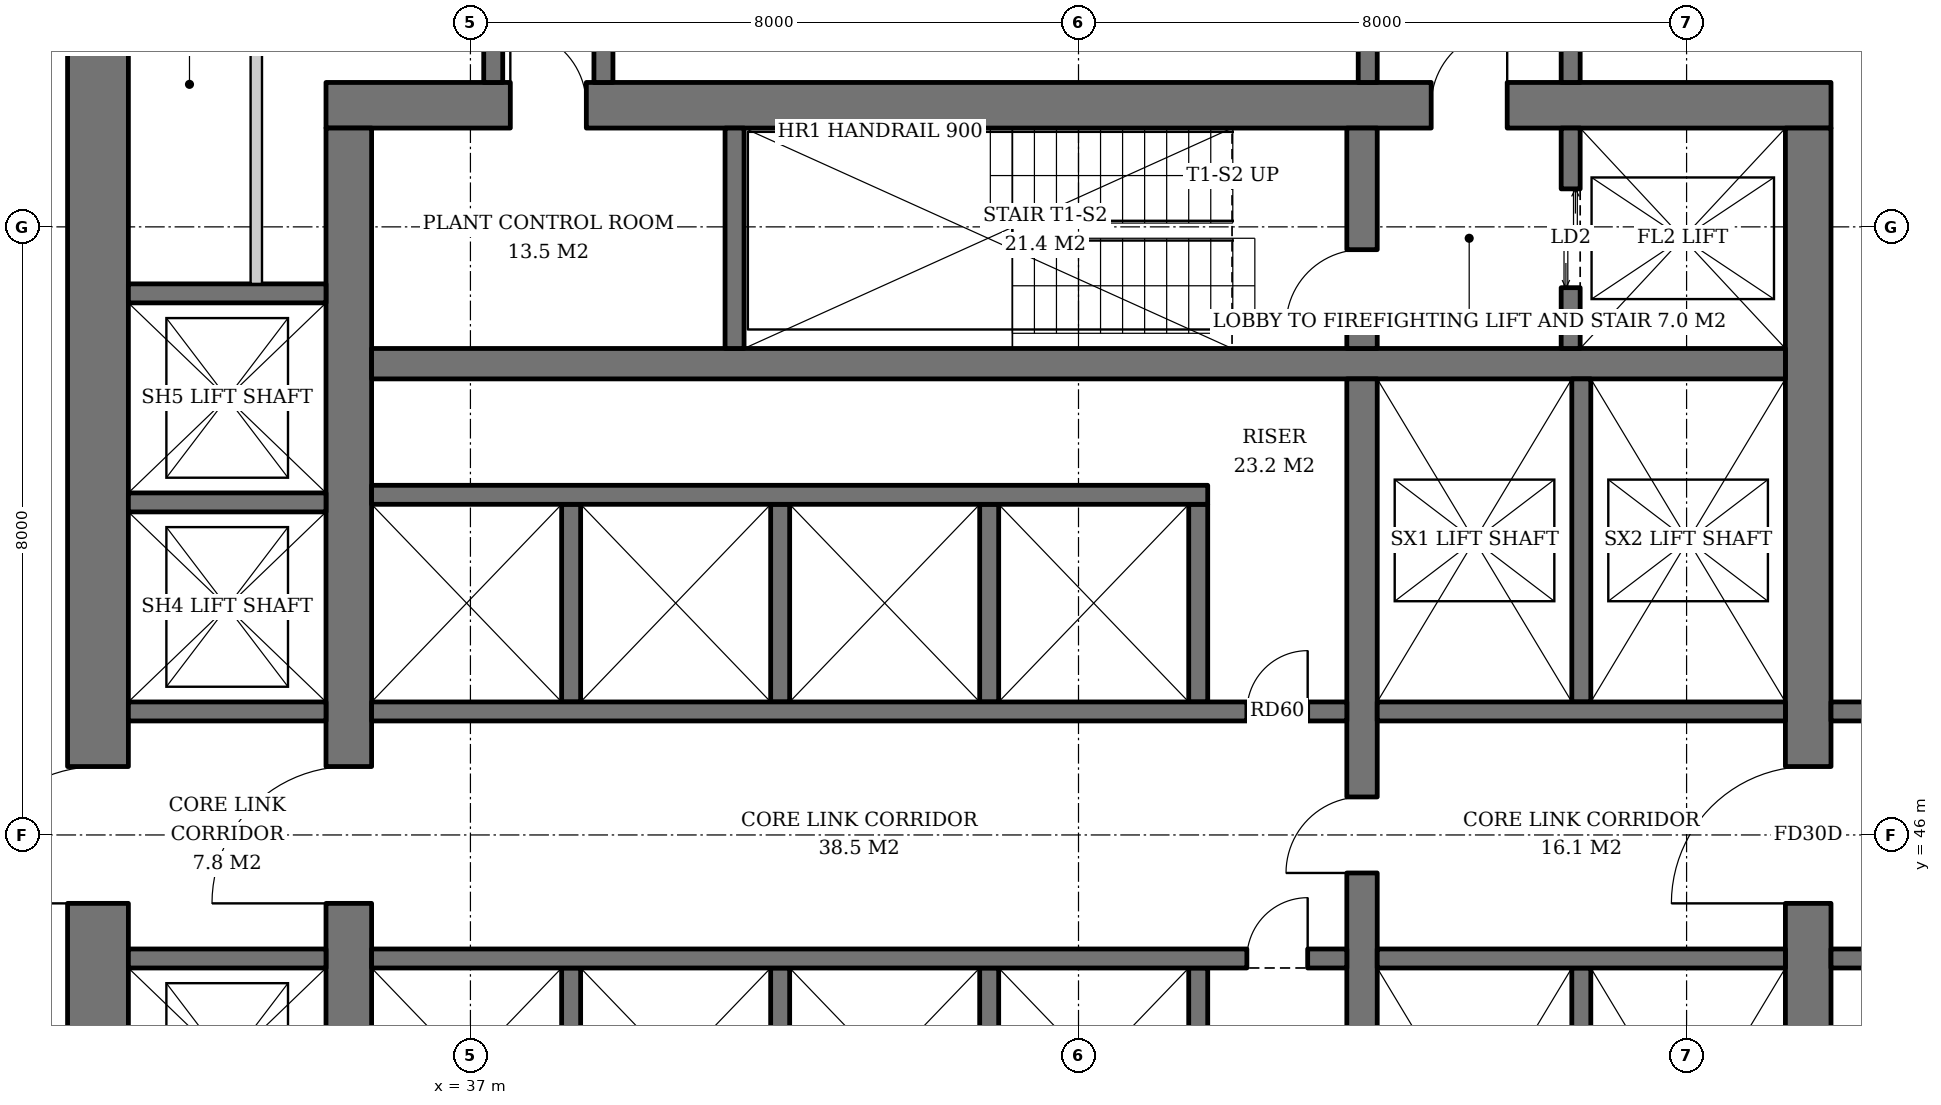
"""IFC4 building model, lengths in metres.
Left out: names, types, materials, properties, quantities, classifications, styles, units other than length and angle.
Written with IfcOpenShell. Run it as: python <this file> out.ifc"""

import sys

from ifc_helpers import new_model, si_unit, direction, frame, frame_2d, origin, place, context, subcontext, project, spatial, rectangle, extrude, element, fill, save


model = new_model("IFC4")
c1 = context("Model", 3, precision=1e-05, world=origin(), true_north=direction((0.0, 1.0)))
c2 = subcontext(c1, "Body", "Model", "MODEL_VIEW")
j1 = project(units=[si_unit("LENGTHUNIT", "METRE"), si_unit("PLANEANGLEUNIT", "RADIAN")], contexts=[c1])
p1 = place(None, origin())
s1 = spatial("IfcSite", under=j1, at=p1, CompositionType="ELEMENT")
p2 = place(p1, origin())
s2 = spatial("IfcBuilding", under=s1, at=p2, CompositionType="ELEMENT")
p3 = place(p2, frame((0.0, 0.0, 81.8)))
s3 = spatial("IfcBuildingStorey", under=s2, at=p3, CompositionType="ELEMENT", Elevation=81.8)
p4 = place(p3, frame((35.1, 55.6, 0.0), z_axis=(0.0, 0.0, 1.0), x_axis=(1.0, 0.0, 0.0)))
e1 = element("IfcWall", 1, at=p4, inside=s3, PredefinedType="SHEAR", context=c2, shape_type="SweptSolid", body=[
    extrude(rectangle(XDim=19.8, YDim=0.6, at=frame_2d((9.9, 0.0))), origin(), (0.0, 0.0, 1.0), 3.8),
])
p5 = place(p4, frame((14.54, 0.0, 0.0)))
e2 = element("IfcOpeningElement", 2, at=p5, cuts=e1, PredefinedType="OPENING", context=c2, shape_type="SweptSolid", body=[
    extrude(rectangle(XDim=1.0, YDim=2.1, at=frame_2d((0.5, 1.05))), frame((0.0, 0.31, 0.0), z_axis=(0.0, -1.0, 0.0), x_axis=(1.0, 0.0, 0.0)), (0.0, 0.0, 1.0), 0.62),
])
p6 = place(p4, frame((2.425, 0.0, 0.0)))
e3 = element("IfcOpeningElement", 3, at=p6, cuts=e1, PredefinedType="OPENING", context=c2, shape_type="SweptSolid", body=[
    extrude(rectangle(XDim=1.0, YDim=2.1, at=frame_2d((0.5, 1.05))), frame((0.0, 0.31, 0.0), z_axis=(0.0, -1.0, 0.0), x_axis=(1.0, 0.0, 0.0)), (0.0, 0.0, 1.0), 0.62),
])
p7 = place(p3, frame((35.4, 36.7, 0.0), z_axis=(0.0, 0.0, 1.0), x_axis=(0.0, 1.0, 0.0)))
e4 = element("IfcWall", 4, at=p7, inside=s3, PredefinedType="SHEAR", context=c2, shape_type="SweptSolid", body=[
    extrude(rectangle(XDim=18.6, YDim=0.6, at=frame_2d((9.3, 0.0))), origin(), (0.0, 0.0, 1.0), 3.8),
])
p8 = place(p7, frame((8.4, 0.0, 0.0)))
e5 = element("IfcOpeningElement", 5, at=p8, cuts=e4, PredefinedType="OPENING", context=c2, shape_type="SweptSolid", body=[
    extrude(rectangle(XDim=1.8, YDim=2.4, at=frame_2d((0.9, 1.2))), frame((0.0, 0.31, 0.0), z_axis=(0.0, -1.0, 0.0), x_axis=(1.0, 0.0, 0.0)), (0.0, 0.0, 1.0), 0.62),
])
p9 = place(p3, frame((54.6, 36.7, 0.0), z_axis=(0.0, 0.0, 1.0), x_axis=(0.0, 1.0, 0.0)))
e6 = element("IfcWall", 6, at=p9, inside=s3, PredefinedType="SHEAR", context=c2, shape_type="SweptSolid", body=[
    extrude(rectangle(XDim=18.6, YDim=0.6, at=frame_2d((9.3, 0.0))), origin(), (0.0, 0.0, 1.0), 3.8),
])
p10 = place(p9, frame((8.4, 0.0, 0.0)))
e7 = element("IfcOpeningElement", 7, at=p10, cuts=e6, PredefinedType="OPENING", context=c2, shape_type="SweptSolid", body=[
    extrude(rectangle(XDim=1.8, YDim=2.4, at=frame_2d((0.9, 1.2))), frame((0.0, 0.31, 0.0), z_axis=(0.0, -1.0, 0.0), x_axis=(1.0, 0.0, 0.0)), (0.0, 0.0, 1.0), 0.62),
])
p11 = place(p3, frame((32.1, 33.5, 0.0), z_axis=(0.0, 0.0, 1.0), x_axis=(0.0, 1.0, 0.0)))
e8 = element("IfcWall", 8, at=p11, inside=s3, PredefinedType="SHEAR", context=c2, shape_type="SweptSolid", body=[
    extrude(rectangle(XDim=25.0, YDim=0.8, at=frame_2d((12.5, 0.0))), origin(), (0.0, 0.0, 1.0), 3.8),
])
p12 = place(p11, frame((11.6, 0.0, 0.0)))
e9 = element("IfcOpeningElement", 9, at=p12, cuts=e8, PredefinedType="OPENING", context=c2, shape_type="SweptSolid", body=[
    extrude(rectangle(XDim=1.8, YDim=2.4, at=frame_2d((0.9, 1.2))), frame((0.0, 0.41, 0.0), z_axis=(0.0, -1.0, 0.0), x_axis=(1.0, 0.0, 0.0)), (0.0, 0.0, 1.0), 0.82),
])
p13 = place(p3, frame((35.7, 52.2, 0.0), z_axis=(0.0, 0.0, 1.0), x_axis=(1.0, 0.0, 0.0)))
e10 = element("IfcWall", 10, at=p13, inside=s3, PredefinedType="SHEAR", context=c2, shape_type="SweptSolid", body=[
    extrude(rectangle(XDim=18.6, YDim=0.4, at=frame_2d((9.3, 0.0))), origin(), (0.0, 0.0, 1.0), 3.8),
])
p14 = place(p3, frame((48.73, 40.0, 0.0), z_axis=(0.0, 0.0, 1.0), x_axis=(0.0, 1.0, 0.0)))
e11 = element("IfcWall", 11, at=p14, inside=s3, PredefinedType="SHEAR", context=c2, shape_type="SweptSolid", body=[
    extrude(rectangle(XDim=12.0, YDim=0.4, at=frame_2d((6.0, 0.0))), origin(), (0.0, 0.0, 1.0), 3.8),
])
p15 = place(p14, frame((5.5, 0.0, 0.0)))
e12 = element("IfcOpeningElement", 12, at=p15, cuts=e11, PredefinedType="OPENING", context=c2, shape_type="SweptSolid", body=[
    extrude(rectangle(XDim=1.0, YDim=2.1, at=frame_2d((0.5, 1.05))), frame((0.0, 0.21, 0.0), z_axis=(0.0, -1.0, 0.0), x_axis=(1.0, 0.0, 0.0)), (0.0, 0.0, 1.0), 0.42),
])
p16 = place(p3, frame((48.73, 52.4, 0.0), z_axis=(0.0, 0.0, 1.0), x_axis=(0.0, 1.0, 0.0)))
e13 = element("IfcWall", 13, at=p16, inside=s3, PredefinedType="SHEAR", context=c2, shape_type="SweptSolid", body=[
    extrude(rectangle(XDim=2.9, YDim=0.4, at=frame_2d((1.45, 0.0))), origin(), (0.0, 0.0, 1.0), 3.8),
])
p17 = place(p16, frame((0.3, 0.0, 0.0)))
e14 = element("IfcOpeningElement", 14, at=p17, cuts=e13, PredefinedType="OPENING", context=c2, shape_type="SweptSolid", body=[
    extrude(rectangle(XDim=1.0, YDim=2.1, at=frame_2d((0.5, 1.05))), frame((0.0, 0.21, 0.0), z_axis=(0.0, -1.0, 0.0), x_axis=(1.0, 0.0, 0.0)), (0.0, 0.0, 1.0), 0.42),
])
p18 = place(p3, frame((40.475, 52.4, 0.0), z_axis=(0.0, 0.0, 1.0), x_axis=(0.0, 1.0, 0.0)))
e15 = element("IfcWall", 15, at=p18, inside=s3, PredefinedType="SHEAR", context=c2, shape_type="SweptSolid", body=[
    extrude(rectangle(XDim=2.9, YDim=0.25, at=frame_2d((1.45, 0.0))), origin(), (0.0, 0.0, 1.0), 3.8),
])
p19 = place(p3, frame((51.475, 52.4, 0.0), z_axis=(0.0, 0.0, 1.0), x_axis=(0.0, 1.0, 0.0)))
e16 = element("IfcWall", 16, at=p19, inside=s3, PredefinedType="SHEAR", context=c2, shape_type="SweptSolid", body=[
    extrude(rectangle(XDim=2.9, YDim=0.25, at=frame_2d((1.45, 0.0))), origin(), (0.0, 0.0, 1.0), 3.8),
])
p20 = place(p19, frame((0.8, 0.0, 0.0)))
e17 = element("IfcOpeningElement", 17, at=p20, cuts=e16, PredefinedType="OPENING", context=c2, shape_type="SweptSolid", body=[
    extrude(rectangle(XDim=1.3, YDim=2.2, at=frame_2d((0.65, 1.1))), frame((0.0, 0.135, 0.0), z_axis=(0.0, -1.0, 0.0), x_axis=(1.0, 0.0, 0.0)), (0.0, 0.0, 1.0), 0.27),
])
for number, where, z_axis, x_axis in (
    (18, (38.325, 47.75, 0.0), (0.0, 0.0, 1.0), (0.0, 1.0, 0.0)),
    (19, (41.075, 47.75, 0.0), (0.0, 0.0, 1.0), (0.0, 1.0, 0.0)),
    (20, (43.825, 47.75, 0.0), (0.0, 0.0, 1.0), (0.0, 1.0, 0.0)),
    (21, (46.575, 47.75, 0.0), (0.0, 0.0, 1.0), (0.0, 1.0, 0.0)),
):
    element("IfcWall", number, at=place(p3, frame(where, z_axis=z_axis, x_axis=x_axis)), inside=s3, PredefinedType="SHEAR", context=c2, shape_type="SweptSolid", body=[
        extrude(rectangle(XDim=2.6, YDim=0.25, at=frame_2d((1.3, 0.0))), origin(), (0.0, 0.0, 1.0), 3.8),
    ])
p21 = place(p3, frame((35.7, 50.475, 0.0), z_axis=(0.0, 0.0, 1.0), x_axis=(1.0, 0.0, 0.0)))
e22 = element("IfcWall", 22, at=p21, inside=s3, PredefinedType="SHEAR", context=c2, shape_type="SweptSolid", body=[
    extrude(rectangle(XDim=11.0, YDim=0.25, at=frame_2d((5.5, 0.0))), origin(), (0.0, 0.0, 1.0), 3.8),
])
p22 = place(p3, frame((35.7, 47.625, 0.0), z_axis=(0.0, 0.0, 1.0), x_axis=(1.0, 0.0, 0.0)))
e23 = element("IfcWall", 23, at=p22, inside=s3, PredefinedType="SHEAR", context=c2, shape_type="SweptSolid", body=[
    extrude(rectangle(XDim=12.83, YDim=0.25, at=frame_2d((6.415, 0.0))), origin(), (0.0, 0.0, 1.0), 3.8),
])
p23 = place(p22, frame((11.515, 0.0, 0.0)))
e24 = element("IfcOpeningElement", 24, at=p23, cuts=e23, PredefinedType="OPENING", context=c2, shape_type="SweptSolid", body=[
    extrude(rectangle(XDim=0.8, YDim=2.0, at=frame_2d((0.4, 1.0))), frame((0.0, 0.135, 0.0), z_axis=(0.0, -1.0, 0.0), x_axis=(1.0, 0.0, 0.0)), (0.0, 0.0, 1.0), 0.27),
])
for number, where, z_axis, x_axis in (
    (25, (38.325, 44.25, 0.0), (0.0, 0.0, 1.0), (0.0, -1.0, 0.0)),
    (26, (41.075, 44.25, 0.0), (0.0, 0.0, 1.0), (0.0, -1.0, 0.0)),
    (27, (43.825, 44.25, 0.0), (0.0, 0.0, 1.0), (0.0, -1.0, 0.0)),
    (28, (46.575, 44.25, 0.0), (0.0, 0.0, 1.0), (0.0, -1.0, 0.0)),
):
    element("IfcWall", number, at=place(p3, frame(where, z_axis=z_axis, x_axis=x_axis)), inside=s3, PredefinedType="SHEAR", context=c2, shape_type="SweptSolid", body=[
        extrude(rectangle(XDim=2.6, YDim=0.25, at=frame_2d((1.3, 0.0))), origin(), (0.0, 0.0, 1.0), 3.8),
    ])
p24 = place(p3, frame((35.7, 44.375, 0.0), z_axis=(0.0, 0.0, 1.0), x_axis=(1.0, 0.0, 0.0)))
e29 = element("IfcWall", 29, at=p24, inside=s3, PredefinedType="SHEAR", context=c2, shape_type="SweptSolid", body=[
    extrude(rectangle(XDim=12.83, YDim=0.25, at=frame_2d((6.415, 0.0))), origin(), (0.0, 0.0, 1.0), 3.8),
])
p25 = place(p24, frame((11.515, 0.0, 0.0)))
e30 = element("IfcOpeningElement", 30, at=p25, cuts=e29, PredefinedType="OPENING", context=c2, shape_type="SweptSolid", body=[
    extrude(rectangle(XDim=0.8, YDim=2.0, at=frame_2d((0.4, 1.0))), frame((0.0, 0.135, 0.0), z_axis=(0.0, -1.0, 0.0), x_axis=(1.0, 0.0, 0.0)), (0.0, 0.0, 1.0), 0.27),
])
p26 = place(p3, frame((51.615, 47.75, 0.0), z_axis=(0.0, 0.0, 1.0), x_axis=(0.0, 1.0, 0.0)))
e31 = element("IfcWall", 31, at=p26, inside=s3, PredefinedType="SHEAR", context=c2, shape_type="SweptSolid", body=[
    extrude(rectangle(XDim=4.25, YDim=0.25, at=frame_2d((2.125, 0.0))), origin(), (0.0, 0.0, 1.0), 3.8),
])
p27 = place(p3, frame((48.93, 47.625, 0.0), z_axis=(0.0, 0.0, 1.0), x_axis=(1.0, 0.0, 0.0)))
e32 = element("IfcWall", 32, at=p27, inside=s3, PredefinedType="SHEAR", context=c2, shape_type="SweptSolid", body=[
    extrude(rectangle(XDim=5.37, YDim=0.25, at=frame_2d((2.685, 0.0))), origin(), (0.0, 0.0, 1.0), 3.8),
])
p28 = place(p3, frame((51.615, 44.25, 0.0), z_axis=(0.0, 0.0, 1.0), x_axis=(0.0, -1.0, 0.0)))
e33 = element("IfcWall", 33, at=p28, inside=s3, PredefinedType="SHEAR", context=c2, shape_type="SweptSolid", body=[
    extrude(rectangle(XDim=4.25, YDim=0.25, at=frame_2d((2.125, 0.0))), origin(), (0.0, 0.0, 1.0), 3.8),
])
p29 = place(p3, frame((48.93, 44.375, 0.0), z_axis=(0.0, 0.0, 1.0), x_axis=(1.0, 0.0, 0.0)))
e34 = element("IfcWall", 34, at=p29, inside=s3, PredefinedType="SHEAR", context=c2, shape_type="SweptSolid", body=[
    extrude(rectangle(XDim=5.37, YDim=0.25, at=frame_2d((2.685, 0.0))), origin(), (0.0, 0.0, 1.0), 3.8),
])
for number, where, z_axis, x_axis in (
    (35, (32.5, 44.375, 0.0), (0.0, 0.0, 1.0), (1.0, 0.0, 0.0)),
    (36, (32.5, 47.625, 0.0), (0.0, 0.0, 1.0), (1.0, 0.0, 0.0)),
    (37, (32.5, 50.375, 0.0), (0.0, 0.0, 1.0), (1.0, 0.0, 0.0)),
    (38, (32.5, 53.125, 0.0), (0.0, 0.0, 1.0), (1.0, 0.0, 0.0)),
):
    element("IfcWall", number, at=place(p3, frame(where, z_axis=z_axis, x_axis=x_axis)), inside=s3, PredefinedType="SHEAR", context=c2, shape_type="SweptSolid", body=[
        extrude(rectangle(XDim=2.6, YDim=0.25, at=frame_2d((1.3, 0.0))), origin(), (0.0, 0.0, 1.0), 3.8),
    ])
p30 = place(p3, frame((48.805, 55.9, 0.0), z_axis=(0.0, 0.0, 1.0), x_axis=(0.0, 1.0, 0.0)))
e39 = element("IfcWall", 39, at=p30, inside=s3, PredefinedType="SOLIDWALL", context=c2, shape_type="SweptSolid", body=[
    extrude(rectangle(XDim=2.6, YDim=0.25, at=frame_2d((1.3, 0.0))), origin(), (0.0, 0.0, 1.0), 3.52),
])
p31 = place(p30, frame((0.8, 0.0, 0.0)))
e40 = element("IfcOpeningElement", 40, at=p31, cuts=e39, PredefinedType="OPENING", context=c2, shape_type="SweptSolid", body=[
    extrude(rectangle(XDim=1.0, YDim=2.1, at=frame_2d((0.5, 1.05))), frame((0.0, 0.135, 0.0), z_axis=(0.0, -1.0, 0.0), x_axis=(1.0, 0.0, 0.0)), (0.0, 0.0, 1.0), 0.27),
])
p32 = place(p3, frame((51.475, 55.9, 0.0), z_axis=(0.0, 0.0, 1.0), x_axis=(0.0, 1.0, 0.0)))
e41 = element("IfcWall", 41, at=p32, inside=s3, PredefinedType="SOLIDWALL", context=c2, shape_type="SweptSolid", body=[
    extrude(rectangle(XDim=2.6, YDim=0.25, at=frame_2d((1.3, 0.0))), origin(), (0.0, 0.0, 1.0), 3.52),
])
p33 = place(p32, frame((0.8, 0.0, 0.0)))
e42 = element("IfcOpeningElement", 42, at=p33, cuts=e41, PredefinedType="OPENING", context=c2, shape_type="SweptSolid", body=[
    extrude(rectangle(XDim=1.0, YDim=2.1, at=frame_2d((0.5, 1.05))), frame((0.0, 0.135, 0.0), z_axis=(0.0, -1.0, 0.0), x_axis=(1.0, 0.0, 0.0)), (0.0, 0.0, 1.0), 0.27),
])
p34 = place(p3, frame((54.9, 44.375, 0.0), z_axis=(0.0, 0.0, 1.0), x_axis=(1.0, 0.0, 0.0)))
e43 = element("IfcWall", 43, at=p34, inside=s3, PredefinedType="SOLIDWALL", context=c2, shape_type="SweptSolid", body=[
    extrude(rectangle(XDim=2.6, YDim=0.25, at=frame_2d((1.3, 0.0))), origin(), (0.0, 0.0, 1.0), 3.52),
])
p35 = place(p34, frame((0.8, 0.0, 0.0)))
e44 = element("IfcOpeningElement", 44, at=p35, cuts=e43, PredefinedType="OPENING", context=c2, shape_type="SweptSolid", body=[
    extrude(rectangle(XDim=1.0, YDim=2.1, at=frame_2d((0.5, 1.05))), frame((0.0, 0.135, 0.0), z_axis=(0.0, -1.0, 0.0), x_axis=(1.0, 0.0, 0.0)), (0.0, 0.0, 1.0), 0.27),
])
p36 = place(p3, frame((54.9, 47.625, 0.0), z_axis=(0.0, 0.0, 1.0), x_axis=(1.0, 0.0, 0.0)))
e45 = element("IfcWall", 45, at=p36, inside=s3, PredefinedType="SOLIDWALL", context=c2, shape_type="SweptSolid", body=[
    extrude(rectangle(XDim=2.6, YDim=0.25, at=frame_2d((1.3, 0.0))), origin(), (0.0, 0.0, 1.0), 3.52),
])
p37 = place(p36, frame((0.8, 0.0, 0.0)))
e46 = element("IfcOpeningElement", 46, at=p37, cuts=e45, PredefinedType="OPENING", context=c2, shape_type="SweptSolid", body=[
    extrude(rectangle(XDim=1.0, YDim=2.1, at=frame_2d((0.5, 1.05))), frame((0.0, 0.135, 0.0), z_axis=(0.0, -1.0, 0.0), x_axis=(1.0, 0.0, 0.0)), (0.0, 0.0, 1.0), 0.27),
])
p38 = place(p3, frame((37.3, 55.9, 0.0), z_axis=(0.0, 0.0, 1.0), x_axis=(0.0, 1.0, 0.0)))
e47 = element("IfcWall", 47, at=p38, inside=s3, PredefinedType="SOLIDWALL", context=c2, shape_type="SweptSolid", body=[
    extrude(rectangle(XDim=2.6, YDim=0.25, at=frame_2d((1.3, 0.0))), origin(), (0.0, 0.0, 1.0), 3.52),
])
p39 = place(p3, frame((38.75, 55.9, 0.0), z_axis=(0.0, 0.0, 1.0), x_axis=(0.0, 1.0, 0.0)))
e48 = element("IfcWall", 48, at=p39, inside=s3, PredefinedType="SOLIDWALL", context=c2, shape_type="SweptSolid", body=[
    extrude(rectangle(XDim=2.6, YDim=0.25, at=frame_2d((1.3, 0.0))), origin(), (0.0, 0.0, 1.0), 3.52),
])
p40 = place(p39, frame((0.8, 0.0, 0.0)))
e49 = element("IfcOpeningElement", 49, at=p40, cuts=e48, PredefinedType="OPENING", context=c2, shape_type="SweptSolid", body=[
    extrude(rectangle(XDim=1.0, YDim=2.1, at=frame_2d((0.5, 1.05))), frame((0.0, 0.135, 0.0), z_axis=(0.0, -1.0, 0.0), x_axis=(1.0, 0.0, 0.0)), (0.0, 0.0, 1.0), 0.27),
])
p41 = place(p3, frame((34.183, 53.25, 0.0), z_axis=(0.0, 0.0, 1.0), x_axis=(0.0, 1.0, 0.0)))
e50 = element("IfcWall", 50, at=p41, inside=s3, PredefinedType="SOLIDWALL", context=c2, shape_type="SweptSolid", body=[
    extrude(rectangle(XDim=5.25, YDim=0.15, at=frame_2d((2.625, 0.0))), origin(), (0.0, 0.0, 1.0), 3.52),
])
p42 = place(p20, origin())
e51 = element("IfcDoor", 51, at=p42, inside=s3, OperationType="DOUBLE_DOOR_SLIDING", PredefinedType="DOOR", context=c2, shape_type="SweptSolid", body=[
    extrude(rectangle(XDim=1.3, YDim=2.2, at=frame_2d((0.65, 1.1))), frame((0.0, 0.025, 0.0), z_axis=(0.0, -1.0, 0.0), x_axis=(1.0, 0.0, 0.0)), (0.0, 0.0, 1.0), 0.05),
])
fill(e17, e51)
p43 = place(p23, origin())
e52 = element("IfcDoor", 52, at=p43, inside=s3, OperationType="SINGLE_SWING_RIGHT", PredefinedType="DOOR", context=c2, shape_type="SweptSolid", body=[
    extrude(rectangle(XDim=0.8, YDim=2.0, at=frame_2d((0.4, 1.0))), frame((0.0, 0.025, 0.0), z_axis=(0.0, -1.0, 0.0), x_axis=(1.0, 0.0, 0.0)), (0.0, 0.0, 1.0), 0.05),
])
fill(e24, e52)
p44 = place(p25, origin())
e53 = element("IfcDoor", 53, at=p44, inside=s3, OperationType="SINGLE_SWING_RIGHT", PredefinedType="DOOR", context=c2, shape_type="SweptSolid", body=[
    extrude(rectangle(XDim=0.8, YDim=2.0, at=frame_2d((0.4, 1.0))), frame((0.0, 0.025, 0.0), z_axis=(0.0, -1.0, 0.0), x_axis=(1.0, 0.0, 0.0)), (0.0, 0.0, 1.0), 0.05),
])
fill(e30, e53)
p45 = place(p15, origin())
e54 = element("IfcDoor", 54, at=p45, inside=s3, OperationType="SINGLE_SWING_LEFT", PredefinedType="DOOR", context=c2, shape_type="SweptSolid", body=[
    extrude(rectangle(XDim=1.0, YDim=2.1, at=frame_2d((0.5, 1.05))), frame((0.0, 0.025, 0.0), z_axis=(0.0, -1.0, 0.0), x_axis=(1.0, 0.0, 0.0)), (0.0, 0.0, 1.0), 0.05),
])
fill(e12, e54)
p46 = place(p17, origin())
e55 = element("IfcDoor", 55, at=p46, inside=s3, OperationType="SINGLE_SWING_LEFT", PredefinedType="DOOR", context=c2, shape_type="SweptSolid", body=[
    extrude(rectangle(XDim=1.0, YDim=2.1, at=frame_2d((0.5, 1.05))), frame((0.0, 0.025, 0.0), z_axis=(0.0, -1.0, 0.0), x_axis=(1.0, 0.0, 0.0)), (0.0, 0.0, 1.0), 0.05),
])
fill(e14, e55)
p47 = place(p5, origin())
e56 = element("IfcDoor", 56, at=p47, inside=s3, OperationType="SINGLE_SWING_RIGHT", PredefinedType="DOOR", context=c2, shape_type="SweptSolid", body=[
    extrude(rectangle(XDim=1.0, YDim=2.1, at=frame_2d((0.5, 1.05))), frame((0.0, 0.025, 0.0), z_axis=(0.0, -1.0, 0.0), x_axis=(1.0, 0.0, 0.0)), (0.0, 0.0, 1.0), 0.05),
])
fill(e2, e56)
p48 = place(p8, origin())
e57 = element("IfcDoor", 57, at=p48, inside=s3, OperationType="DOUBLE_DOOR_SINGLE_SWING", PredefinedType="DOOR", context=c2, shape_type="SweptSolid", body=[
    extrude(rectangle(XDim=1.8, YDim=2.4, at=frame_2d((0.9, 1.2))), frame((0.0, 0.025, 0.0), z_axis=(0.0, -1.0, 0.0), x_axis=(1.0, 0.0, 0.0)), (0.0, 0.0, 1.0), 0.05),
])
fill(e5, e57)
p49 = place(p10, origin())
e58 = element("IfcDoor", 58, at=p49, inside=s3, OperationType="DOUBLE_DOOR_SINGLE_SWING", PredefinedType="DOOR", context=c2, shape_type="SweptSolid", body=[
    extrude(rectangle(XDim=1.8, YDim=2.4, at=frame_2d((0.9, 1.2))), frame((0.0, 0.025, 0.0), z_axis=(0.0, -1.0, 0.0), x_axis=(1.0, 0.0, 0.0)), (0.0, 0.0, 1.0), 0.05),
])
fill(e7, e58)
p50 = place(p12, origin())
e59 = element("IfcDoor", 59, at=p50, inside=s3, OperationType="DOUBLE_DOOR_SINGLE_SWING", PredefinedType="DOOR", context=c2, shape_type="SweptSolid", body=[
    extrude(rectangle(XDim=1.8, YDim=2.4, at=frame_2d((0.9, 1.2))), frame((0.0, 0.025, 0.0), z_axis=(0.0, -1.0, 0.0), x_axis=(1.0, 0.0, 0.0)), (0.0, 0.0, 1.0), 0.05),
])
fill(e9, e59)
p51 = place(p6, origin())
e60 = element("IfcDoor", 60, at=p51, inside=s3, OperationType="SINGLE_SWING_LEFT", PredefinedType="DOOR", context=c2, shape_type="SweptSolid", body=[
    extrude(rectangle(XDim=1.0, YDim=2.1, at=frame_2d((0.5, 1.05))), frame((0.0, -0.24, 0.0), z_axis=(0.0, -1.0, 0.0), x_axis=(1.0, 0.0, 0.0)), (0.0, 0.0, 1.0), 0.05),
])
fill(e3, e60)
save(model, sys.argv[1])
